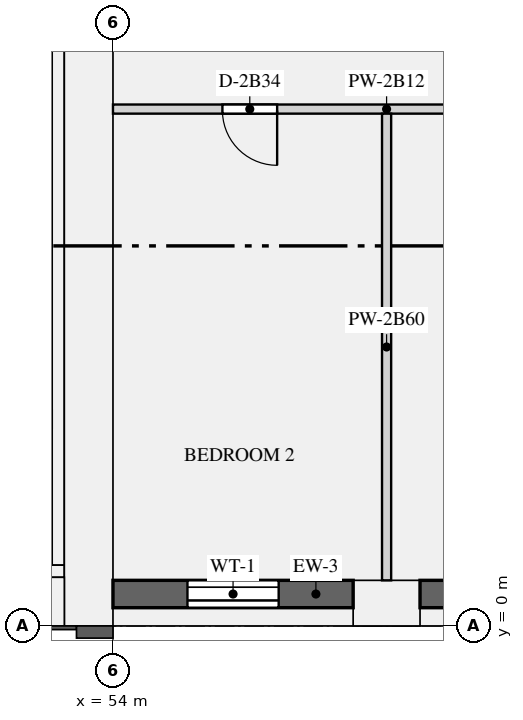
"""IFC4 building model, lengths in metres.
Left out: names, types, materials, properties, quantities, classifications, styles, units other than length and angle.
Written with IfcOpenShell. Run it as: python <this file> out.ifc"""

import sys

from ifc_helpers import new_model, si_unit, direction, frame, frame_2d, origin, origin_2d, place, context, subcontext, project, spatial, rectangle, extrude, element, fill, save


model = new_model("IFC4")
c1 = context("Model", 3, precision=1e-05, world=origin(), true_north=direction((0.0, 1.0)))
c2 = subcontext(c1, "Body", "Model", "MODEL_VIEW")
j1 = project(units=[si_unit("LENGTHUNIT", "METRE"), si_unit("PLANEANGLEUNIT", "RADIAN")], contexts=[c1])
p1 = place(None, origin())
s1 = spatial("IfcSite", under=j1, at=p1, CompositionType="ELEMENT")
p2 = place(p1, origin())
s2 = spatial("IfcBuilding", under=s1, at=p2, CompositionType="ELEMENT")
p3 = place(p2, frame((0.0, 0.0, 93.0)))
s3 = spatial("IfcBuildingStorey", under=s2, at=p3, CompositionType="ELEMENT", Elevation=93.0)
p4 = place(p3, frame((58.5, 0.375, 0.0), z_axis=(0.0, 0.0, 1.0), x_axis=(1.0, 0.0, 0.0)))
e1 = element("IfcColumn", 1, at=p4, inside=s3, PredefinedType="USERDEFINED", context=c2, shape_type="SweptSolid", body=[
    extrude(rectangle(XDim=1.1, YDim=0.75, at=origin_2d()), origin(), (0.0, 0.0, 1.0), 3.15),
])
p5 = place(p3, frame((53.6, 0.0, 0.0), z_axis=(0.0, 0.0, 1.0), x_axis=(0.0, 1.0, 0.0)))
e2 = element("IfcWall", 2, at=p5, inside=s3, PredefinedType="SHEAR", context=c2, shape_type="SweptSolid", body=[
    extrude(rectangle(XDim=12.5, YDim=0.8, at=frame_2d((6.25, 0.0))), origin(), (0.0, 0.0, 1.0), 3.15),
])
p6 = place(p3, frame((18.8, 0.4, 0.0), z_axis=(0.0, 0.0, 1.0), x_axis=(1.0, 0.0, 0.0)))
e3 = element("IfcWall", 3, at=p6, inside=s3, PredefinedType="SHEAR", context=c2, shape_type="SweptSolid", body=[
    extrude(rectangle(XDim=34.4, YDim=0.8, at=frame_2d((17.2, 0.0))), origin(), (0.0, 0.0, 1.0), 3.15),
])
p7 = place(p3, frame((53.1, 1.0, 0.0), z_axis=(0.0, 0.0, 1.0), x_axis=(0.0, 1.0, 0.0)))
e4 = element("IfcWall", 4, at=p7, inside=s3, PredefinedType="SHEAR", context=c2, shape_type="SweptSolid", body=[
    extrude(rectangle(XDim=10.9, YDim=0.2, at=frame_2d((5.45, 0.0))), origin(), (0.0, 0.0, 1.0), 3.15),
])
p8 = place(p3, frame((18.8, 0.9, 0.0), z_axis=(0.0, 0.0, 1.0), x_axis=(1.0, 0.0, 0.0)))
e5 = element("IfcWall", 5, at=p8, inside=s3, PredefinedType="SHEAR", context=c2, shape_type="SweptSolid", body=[
    extrude(rectangle(XDim=34.4, YDim=0.2, at=frame_2d((17.2, 0.0))), origin(), (0.0, 0.0, 1.0), 3.15),
])
p9 = place(p3, frame((54.0, 0.525, 0.9), z_axis=(0.0, 0.0, 1.0), x_axis=(1.0, 0.0, 0.0)))
e6 = element("IfcWall", 6, at=p9, inside=s3, PredefinedType="SOLIDWALL", context=c2, shape_type="SweptSolid", body=[
    extrude(rectangle(XDim=3.95, YDim=0.45, at=frame_2d((1.975, 0.0))), origin(), (0.0, 0.0, 1.0), 1.93),
])
p10 = place(p9, frame((1.225, 0.0, 0.15)))
e7 = element("IfcOpeningElement", 7, at=p10, cuts=e6, PredefinedType="OPENING", context=c2, shape_type="SweptSolid", body=[
    extrude(rectangle(XDim=1.5, YDim=1.5, at=frame_2d((0.75, 0.75))), frame((0.0, 0.235, 0.0), z_axis=(0.0, -1.0, 0.0), x_axis=(1.0, 0.0, 0.0)), (0.0, 0.0, 1.0), 0.47),
])
p11 = place(p3, frame((59.05, 0.525, 0.9), z_axis=(0.0, 0.0, 1.0), x_axis=(1.0, 0.0, 0.0)))
e8 = element("IfcWall", 8, at=p11, inside=s3, PredefinedType="SOLIDWALL", context=c2, shape_type="SweptSolid", body=[
    extrude(rectangle(XDim=3.4, YDim=0.45, at=frame_2d((1.7, 0.0))), origin(), (0.0, 0.0, 1.0), 1.93),
])
p12 = place(p11, frame((0.95, 0.0, 0.15)))
e9 = element("IfcOpeningElement", 9, at=p12, cuts=e8, PredefinedType="OPENING", context=c2, shape_type="SweptSolid", body=[
    extrude(rectangle(XDim=1.5, YDim=1.5, at=frame_2d((0.75, 0.75))), frame((0.0, 0.235, 0.0), z_axis=(0.0, -1.0, 0.0), x_axis=(1.0, 0.0, 0.0)), (0.0, 0.0, 1.0), 0.47),
])
p13 = place(p3, frame((54.0, 8.5, 0.0), z_axis=(0.0, 0.0, 1.0), x_axis=(1.0, 0.0, 0.0)))
e10 = element("IfcWall", 10, at=p13, inside=s3, PredefinedType="PARTITIONING", context=c2, shape_type="SweptSolid", body=[
    extrude(rectangle(XDim=8.925, YDim=0.15, at=frame_2d((4.462, 0.0))), origin(), (0.0, 0.0, 1.0), 2.83),
])
p14 = place(p13, frame((1.8, 0.0, 0.0)))
e11 = element("IfcOpeningElement", 11, at=p14, cuts=e10, PredefinedType="OPENING", context=c2, shape_type="SweptSolid", body=[
    extrude(rectangle(XDim=0.9, YDim=2.1, at=frame_2d((0.45, 1.05))), frame((0.0, 0.085, 0.0), z_axis=(0.0, -1.0, 0.0), x_axis=(1.0, 0.0, 0.0)), (0.0, 0.0, 1.0), 0.17),
])
p15 = place(p13, frame((6.3, 0.0, 0.0)))
e12 = element("IfcOpeningElement", 12, at=p15, cuts=e10, PredefinedType="OPENING", context=c2, shape_type="SweptSolid", body=[
    extrude(rectangle(XDim=0.9, YDim=2.1, at=frame_2d((0.45, 1.05))), frame((0.0, 0.085, 0.0), z_axis=(0.0, -1.0, 0.0), x_axis=(1.0, 0.0, 0.0)), (0.0, 0.0, 1.0), 0.17),
])
p16 = place(p3, frame((58.5, 0.75, 0.0), z_axis=(0.0, 0.0, 1.0), x_axis=(0.0, 1.0, 0.0)))
e13 = element("IfcWall", 13, at=p16, inside=s3, PredefinedType="PARTITIONING", context=c2, shape_type="SweptSolid", body=[
    extrude(rectangle(XDim=7.675, YDim=0.15, at=frame_2d((3.837, 0.0))), origin(), (0.0, 0.0, 1.0), 2.83),
])
p17 = place(p10, origin())
e14 = element("IfcWindow", 14, at=p17, inside=s3, PartitioningType="SINGLE_PANEL", PredefinedType="WINDOW", context=c2, shape_type="SweptSolid", body=[
    extrude(rectangle(XDim=1.5, YDim=1.5, at=frame_2d((0.75, 0.75))), frame((0.0, -0.065, 0.0), z_axis=(0.0, -1.0, 0.0), x_axis=(1.0, 0.0, 0.0)), (0.0, 0.0, 1.0), 0.06),
])
fill(e7, e14)
p18 = place(p14, frame((0.9, 0.0, 0.0), z_axis=(0.0, 0.0, 1.0), x_axis=(-1.0, 0.0, 0.0)))
e15 = element("IfcDoor", 15, at=p18, inside=s3, OperationType="SINGLE_SWING_LEFT", PredefinedType="DOOR", context=c2, shape_type="SweptSolid", body=[
    extrude(rectangle(XDim=0.9, YDim=2.1, at=frame_2d((0.45, 1.05))), frame((0.0, 0.025, 0.0), z_axis=(0.0, -1.0, 0.0), x_axis=(1.0, 0.0, 0.0)), (0.0, 0.0, 1.0), 0.05),
])
fill(e11, e15)
save(model, sys.argv[1])
